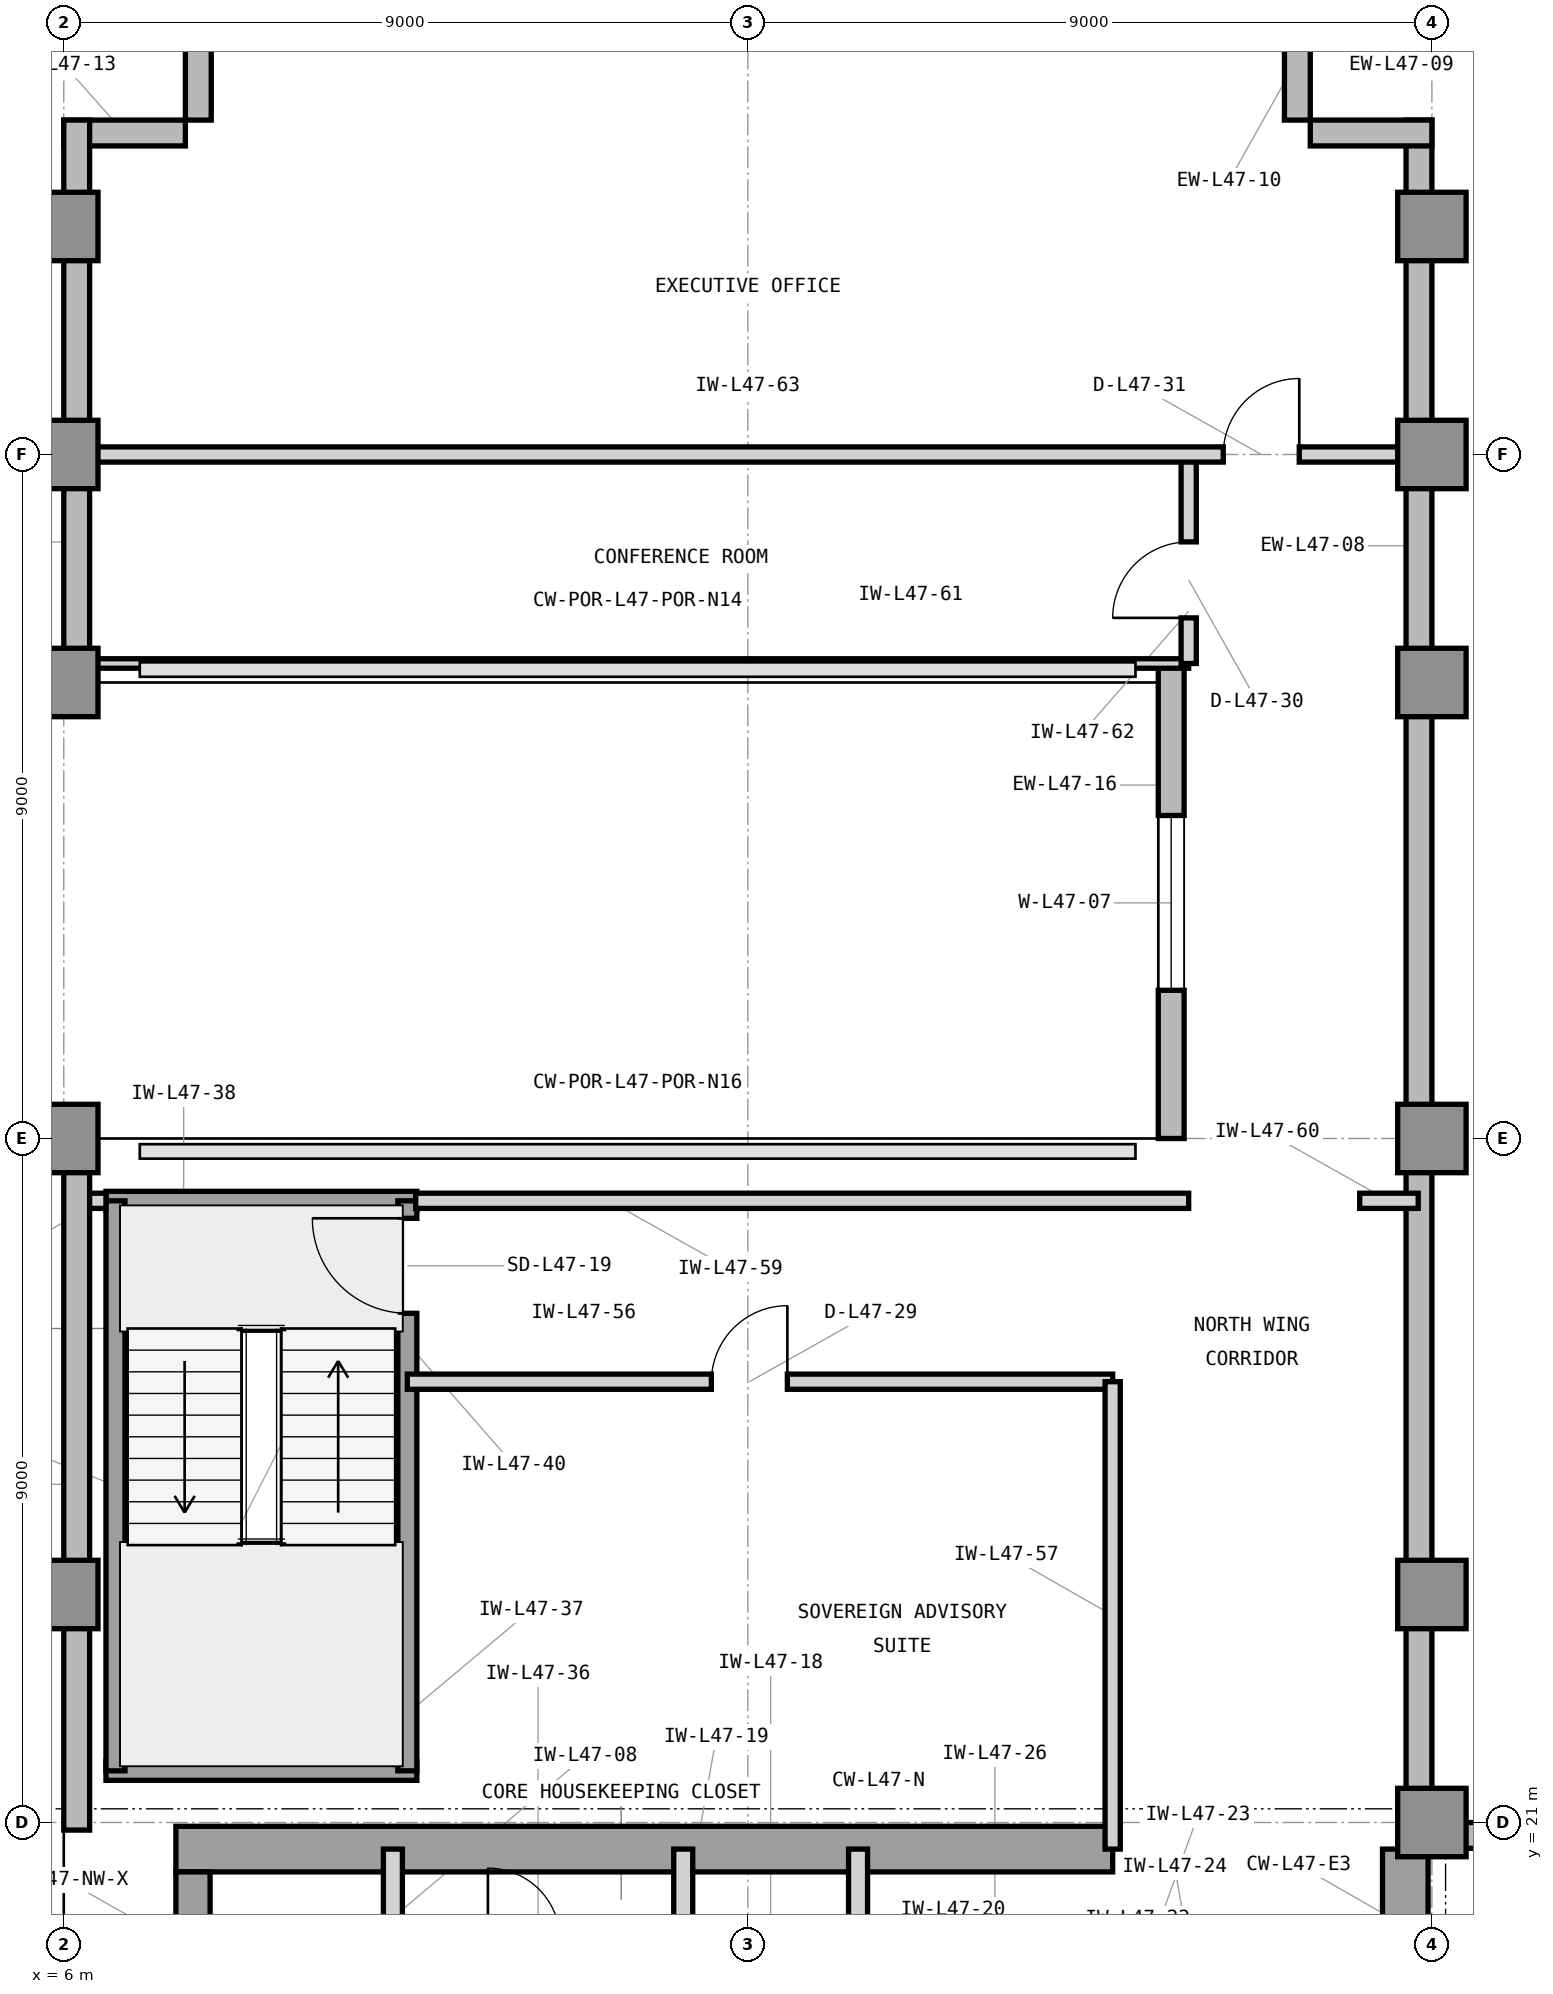
"""IFC4 building model, lengths in metres.
Left out: names, types, materials, properties, quantities, classifications, styles, units other than length and angle.
Written with IfcOpenShell. Run it as: python <this file> out.ifc"""

import sys

from ifc_helpers import new_model, si_unit, direction, frame, frame_2d, origin, origin_2d, place, context, subcontext, project, spatial, rectangle, extrude, element, fill, save


model = new_model("IFC4")
c1 = context("Model", 3, precision=1e-05, world=origin(), true_north=direction((0.0, 1.0)))
c2 = subcontext(c1, "Body", "Model", "MODEL_VIEW")
j1 = project(units=[si_unit("LENGTHUNIT", "METRE"), si_unit("PLANEANGLEUNIT", "RADIAN")], contexts=[c1])
p1 = place(None, origin())
s1 = spatial("IfcSite", under=j1, at=p1, CompositionType="ELEMENT")
p2 = place(p1, origin())
s2 = spatial("IfcBuilding", under=s1, at=p2, CompositionType="ELEMENT")
p3 = place(p2, frame((0.0, 0.0, 195.6)))
s3 = spatial("IfcBuildingStorey", under=s2, at=p3, CompositionType="ELEMENT", Elevation=195.6)
p4 = place(p3, frame((7.475, 20.65, 0.0), z_axis=(0.0, 0.0, 1.0), x_axis=(1.0, 0.0, 0.0)))
e1 = element("IfcWall", 1, at=p4, inside=s3, PredefinedType="SHEAR", context=c2, shape_type="SweptSolid", body=[
    extrude(rectangle(XDim=12.325, YDim=0.6, at=frame_2d((6.163, 0.0))), origin(), (0.0, 0.0, 1.0), 3.9),
])
p5 = place(p3, frame((23.65, 16.6, 0.0), z_axis=(0.0, 0.0, 1.0), x_axis=(0.0, 1.0, 0.0)))
e2 = element("IfcWall", 2, at=p5, inside=s3, PredefinedType="SHEAR", context=c2, shape_type="SweptSolid", body=[
    extrude(rectangle(XDim=4.05, YDim=0.6, at=frame_2d((2.025, 0.0))), origin(), (0.0, 0.0, 1.0), 3.9),
])
p6 = place(p3, frame((7.7, 19.575, 0.0), z_axis=(0.0, 0.0, 1.0), x_axis=(0.0, 1.0, 0.0)))
e3 = element("IfcWall", 3, at=p6, inside=s3, PredefinedType="SHEAR", context=c2, shape_type="SweptSolid", body=[
    extrude(rectangle(XDim=0.775, YDim=0.45, at=frame_2d((0.388, 0.0))), origin(), (0.0, 0.0, 1.0), 3.9),
])
for number, where, z_axis, x_axis in (
    (4, (24.0, 21.0, 0.0), (0.0, 0.0, 1.0), (1.0, 0.0, 0.0)),
    (5, (6.0, 24.0, 0.0), (0.0, 0.0, 1.0), (1.0, 0.0, 0.0)),
    (6, (24.0, 24.0, 0.0), (0.0, 0.0, 1.0), (1.0, 0.0, 0.0)),
    (7, (6.0, 30.0, 0.0), (0.0, 0.0, 1.0), (1.0, 0.0, 0.0)),
    (8, (24.0, 30.0, 0.0), (0.0, 0.0, 1.0), (1.0, 0.0, 0.0)),
    (9, (6.0, 36.0, 0.0), (0.0, 0.0, 1.0), (1.0, 0.0, 0.0)),
    (10, (24.0, 36.0, 0.0), (0.0, 0.0, 1.0), (1.0, 0.0, 0.0)),
    (11, (6.0, 39.0, 0.0), (0.0, 0.0, 1.0), (1.0, 0.0, 0.0)),
    (12, (24.0, 39.0, 0.0), (0.0, 0.0, 1.0), (1.0, 0.0, 0.0)),
):
    element("IfcColumn", number, at=place(p3, frame(where, z_axis=z_axis, x_axis=x_axis)), inside=s3, PredefinedType="COLUMN", context=c2, shape_type="SweptSolid", body=[
        extrude(rectangle(XDim=0.9, YDim=0.9, at=origin_2d()), origin(), (0.0, 0.0, 1.0), 3.9),
    ])
for number, where, z_axis, x_axis in (
    (13, (6.0, 42.0, 0.0), (0.0, 0.0, 1.0), (1.0, 0.0, 0.0)),
    (14, (24.0, 42.0, 0.0), (0.0, 0.0, 1.0), (1.0, 0.0, 0.0)),
):
    element("IfcColumn", number, at=place(p3, frame(where, z_axis=z_axis, x_axis=x_axis)), inside=s3, PredefinedType="COLUMN", context=c2, shape_type="SweptSolid", body=[
        extrude(rectangle(XDim=0.9, YDim=0.9, at=origin_2d()), origin(), (0.0, 0.0, 1.0), 3.689),
    ])
p7 = place(p3, frame((55.4, 20.83, 0.0), z_axis=(0.0, 0.0, 1.0), x_axis=(-1.0, 0.0, 0.0)))
e15 = element("IfcWall", 15, at=p7, inside=s3, PredefinedType="STANDARD", context=c2, shape_type="SweptSolid", body=[
    extrude(rectangle(XDim=31.4, YDim=0.34, at=frame_2d((15.7, 0.0))), origin(), (0.0, 0.0, 1.0), 3.7),
])
p8 = place(p7, frame((17.167, 0.0, 0.9)))
e16 = element("IfcOpeningElement", 16, at=p8, cuts=e15, PredefinedType="OPENING", context=c2, shape_type="SweptSolid", body=[
    extrude(rectangle(XDim=2.3, YDim=2.2, at=frame_2d((1.15, 1.1))), frame((0.0, 0.18, 0.0), z_axis=(0.0, -1.0, 0.0), x_axis=(1.0, 0.0, 0.0)), (0.0, 0.0, 1.0), 0.36),
])
p9 = place(p7, frame((29.046, 0.0, 0.9)))
e17 = element("IfcOpeningElement", 17, at=p9, cuts=e15, PredefinedType="OPENING", context=c2, shape_type="SweptSolid", body=[
    extrude(rectangle(XDim=1.6, YDim=2.2, at=frame_2d((0.8, 1.1))), frame((0.0, 0.18, 0.0), z_axis=(0.0, -1.0, 0.0), x_axis=(1.0, 0.0, 0.0)), (0.0, 0.0, 1.0), 0.36),
])
p10 = place(p7, frame((8.375, 0.0, 0.9)))
e18 = element("IfcOpeningElement", 18, at=p10, cuts=e15, PredefinedType="OPENING", context=c2, shape_type="SweptSolid", body=[
    extrude(rectangle(XDim=2.3, YDim=2.2, at=frame_2d((1.15, 1.1))), frame((0.0, 0.18, 0.0), z_axis=(0.0, -1.0, 0.0), x_axis=(1.0, 0.0, 0.0)), (0.0, 0.0, 1.0), 0.36),
])
p11 = place(p3, frame((23.83, 21.0, 0.0), z_axis=(0.0, 0.0, 1.0), x_axis=(0.0, 1.0, 0.0)))
e19 = element("IfcWall", 19, at=p11, inside=s3, PredefinedType="STANDARD", context=c2, shape_type="SweptSolid", body=[
    extrude(rectangle(XDim=22.4, YDim=0.34, at=frame_2d((11.2, 0.0))), origin(), (0.0, 0.0, 1.0), 3.7),
])
for number, where, z_axis, x_axis in (
    (20, (24.0, 43.23, 0.0), (0.0, 0.0, 1.0), (-1.0, 0.0, 0.0)),
    (21, (22.23, 43.4, 0.0), (0.0, 0.0, 1.0), (0.0, 1.0, 0.0)),
    (22, (7.77, 45.0, 0.0), (0.0, 0.0, 1.0), (0.0, -1.0, 0.0)),
    (23, (7.6, 43.23, 0.0), (0.0, 0.0, 1.0), (-1.0, 0.0, 0.0)),
):
    element("IfcWall", number, at=place(p3, frame(where, z_axis=z_axis, x_axis=x_axis)), inside=s3, PredefinedType="STANDARD", context=c2, shape_type="SweptSolid", body=[
        extrude(rectangle(XDim=1.6, YDim=0.34, at=frame_2d((0.8, 0.0))), origin(), (0.0, 0.0, 1.0), 3.7),
    ])
p12 = place(p3, frame((6.17, 43.4, 0.0), z_axis=(0.0, 0.0, 1.0), x_axis=(0.0, -1.0, 0.0)))
e24 = element("IfcWall", 24, at=p12, inside=s3, PredefinedType="STANDARD", context=c2, shape_type="SweptSolid", body=[
    extrude(rectangle(XDim=7.4, YDim=0.34, at=frame_2d((3.7, 0.0))), origin(), (0.0, 0.0, 1.0), 3.7),
])
p13 = place(p3, frame((20.57, 36.2, 0.0), z_axis=(0.0, 0.0, 1.0), x_axis=(0.0, -1.0, 0.0)))
e25 = element("IfcWall", 25, at=p13, inside=s3, PredefinedType="STANDARD", context=c2, shape_type="SweptSolid", body=[
    extrude(rectangle(XDim=6.2, YDim=0.34, at=frame_2d((3.1, 0.0))), origin(), (0.0, 0.0, 1.0), 3.7),
])
p14 = place(p13, frame((1.95, 0.0, 0.9)))
e26 = element("IfcOpeningElement", 26, at=p14, cuts=e25, PredefinedType="OPENING", context=c2, shape_type="SweptSolid", body=[
    extrude(rectangle(XDim=2.3, YDim=2.2, at=frame_2d((1.15, 1.1))), frame((0.0, 0.18, 0.0), z_axis=(0.0, -1.0, 0.0), x_axis=(1.0, 0.0, 0.0)), (0.0, 0.0, 1.0), 0.36),
])
p15 = place(p3, frame((6.17, 30.0, 0.0), z_axis=(0.0, 0.0, 1.0), x_axis=(0.0, -1.0, 0.0)))
e27 = element("IfcWall", 27, at=p15, inside=s3, PredefinedType="STANDARD", context=c2, shape_type="SweptSolid", body=[
    extrude(rectangle(XDim=9.1, YDim=0.34, at=frame_2d((4.55, 0.0))), origin(), (0.0, 0.0, 1.0), 3.7),
])
p16 = place(p3, frame((10.33, 19.45, 0.0), z_axis=(0.0, 0.0, 1.0), x_axis=(0.0, 1.0, 0.0)))
e28 = element("IfcWall", 28, at=p16, inside=s3, PredefinedType="PARTITIONING", context=c2, shape_type="SweptSolid", body=[
    extrude(rectangle(XDim=1.2, YDim=0.25, at=frame_2d((0.6, 0.0))), origin(), (0.0, 0.0, 1.0), 3.69),
])
for number, where, z_axis, x_axis in (
    (29, (14.15, 16.7, 0.0), (0.0, 0.0, 1.0), (0.0, 1.0, 0.0)),
    (30, (16.45, 16.7, 0.0), (0.0, 0.0, 1.0), (0.0, 1.0, 0.0)),
):
    element("IfcWall", number, at=place(p3, frame(where, z_axis=z_axis, x_axis=x_axis)), inside=s3, PredefinedType="PARTITIONING", context=c2, shape_type="SweptSolid", body=[
        extrude(rectangle(XDim=3.95, YDim=0.25, at=frame_2d((1.975, 0.0))), origin(), (0.0, 0.0, 1.0), 3.69),
    ])
for number, where, z_axis, x_axis in (
    (31, (6.555, 21.68, 0.0), (0.0, 0.0, 1.0), (1.0, 0.0, 0.0)),
    (32, (6.555, 29.18, 0.0), (0.0, 0.0, 1.0), (1.0, 0.0, 0.0)),
):
    element("IfcWall", number, at=place(p3, frame(where, z_axis=z_axis, x_axis=x_axis)), inside=s3, PredefinedType="SHEAR", context=c2, shape_type="SweptSolid", body=[
        extrude(rectangle(XDim=4.09, YDim=0.25, at=frame_2d((2.045, 0.0))), origin(), (0.0, 0.0, 1.0), 3.9),
    ])
p17 = place(p3, frame((6.68, 21.68, 0.0), z_axis=(0.0, 0.0, 1.0), x_axis=(0.0, 1.0, 0.0)))
e33 = element("IfcWall", 33, at=p17, inside=s3, PredefinedType="SHEAR", context=c2, shape_type="SweptSolid", body=[
    extrude(rectangle(XDim=7.5, YDim=0.25, at=frame_2d((3.75, 0.0))), origin(), (0.0, 0.0, 1.0), 3.9),
])
p18 = place(p3, frame((10.52, 21.68, 0.0), z_axis=(0.0, 0.0, 1.0), x_axis=(0.0, 1.0, 0.0)))
e34 = element("IfcWall", 34, at=p18, inside=s3, PredefinedType="SHEAR", context=c2, shape_type="SweptSolid", body=[
    extrude(rectangle(XDim=7.5, YDim=0.25, at=frame_2d((3.75, 0.0))), origin(), (0.0, 0.0, 1.0), 3.9),
])
p19 = place(p18, frame((6.02, 0.0, 0.0)))
e35 = element("IfcOpeningElement", 35, at=p19, cuts=e34, PredefinedType="OPENING", context=c2, shape_type="SweptSolid", body=[
    extrude(rectangle(XDim=1.25, YDim=2.2, at=frame_2d((0.625, 1.1))), frame((0.0, 0.135, 0.0), z_axis=(0.0, -1.0, 0.0), x_axis=(1.0, 0.0, 0.0)), (0.0, 0.0, 1.0), 0.27),
])
p20 = place(p3, frame((10.52, 26.8, 0.0), z_axis=(0.0, 0.0, 1.0), x_axis=(1.0, 0.0, 0.0)))
e36 = element("IfcWall", 36, at=p20, inside=s3, PredefinedType="PARTITIONING", context=c2, shape_type="SweptSolid", body=[
    extrude(rectangle(XDim=9.28, YDim=0.2, at=frame_2d((4.64, 0.0))), origin(), (0.0, 0.0, 1.0), 3.69),
])
p21 = place(p20, frame((4.0, 0.0, 0.0)))
e37 = element("IfcOpeningElement", 37, at=p21, cuts=e36, PredefinedType="OPENING", context=c2, shape_type="SweptSolid", body=[
    extrude(rectangle(XDim=1.0, YDim=2.15, at=frame_2d((0.5, 1.075))), frame((0.0, 0.11, 0.0), z_axis=(0.0, -1.0, 0.0), x_axis=(1.0, 0.0, 0.0)), (0.0, 0.0, 1.0), 0.22),
])
p22 = place(p3, frame((19.8, 20.65, 0.0), z_axis=(0.0, 0.0, 1.0), x_axis=(0.0, 1.0, 0.0)))
e38 = element("IfcWall", 38, at=p22, inside=s3, PredefinedType="PARTITIONING", context=c2, shape_type="SweptSolid", body=[
    extrude(rectangle(XDim=6.15, YDim=0.2, at=frame_2d((3.075, 0.0))), origin(), (0.0, 0.0, 1.0), 3.69),
])
p23 = place(p3, frame((6.34, 29.18, 0.0), z_axis=(0.0, 0.0, 1.0), x_axis=(1.0, 0.0, 0.0)))
e39 = element("IfcWall", 39, at=p23, inside=s3, PredefinedType="PARTITIONING", context=c2, shape_type="SweptSolid", body=[
    extrude(rectangle(XDim=0.215, YDim=0.2, at=frame_2d((0.107, 0.0))), origin(), (0.0, 0.0, 1.0), 3.69),
])
p24 = place(p3, frame((10.63, 29.18, 0.0), z_axis=(0.0, 0.0, 1.0), x_axis=(1.0, 0.0, 0.0)))
e40 = element("IfcWall", 40, at=p24, inside=s3, PredefinedType="PARTITIONING", context=c2, shape_type="SweptSolid", body=[
    extrude(rectangle(XDim=10.17, YDim=0.2, at=frame_2d((5.085, 0.0))), origin(), (0.0, 0.0, 1.0), 3.69),
])
p25 = place(p3, frame((23.05, 29.18, 0.0), z_axis=(0.0, 0.0, 1.0), x_axis=(1.0, 0.0, 0.0)))
e41 = element("IfcWall", 41, at=p25, inside=s3, PredefinedType="PARTITIONING", context=c2, shape_type="SweptSolid", body=[
    extrude(rectangle(XDim=0.77, YDim=0.2, at=frame_2d((0.385, 0.0))), origin(), (0.0, 0.0, 1.0), 3.69),
])
p26 = place(p3, frame((6.18, 36.25, 0.0), z_axis=(0.0, 0.0, 1.0), x_axis=(1.0, 0.0, 0.0)))
e42 = element("IfcWall", 42, at=p26, inside=s3, PredefinedType="PARTITIONING", context=c2, shape_type="SweptSolid", body=[
    extrude(rectangle(XDim=14.62, YDim=0.125, at=frame_2d((7.31, 0.0))), origin(), (0.0, 0.0, 1.0), 3.69),
])
p27 = place(p3, frame((20.8, 36.25, 0.0), z_axis=(0.0, 0.0, 1.0), x_axis=(0.0, 1.0, 0.0)))
e43 = element("IfcWall", 43, at=p27, inside=s3, PredefinedType="PARTITIONING", context=c2, shape_type="SweptSolid", body=[
    extrude(rectangle(XDim=2.75, YDim=0.2, at=frame_2d((1.375, 0.0))), origin(), (0.0, 0.0, 1.0), 3.69),
])
p28 = place(p27, frame((0.6, 0.0, 0.0)))
e44 = element("IfcOpeningElement", 44, at=p28, cuts=e43, PredefinedType="OPENING", context=c2, shape_type="SweptSolid", body=[
    extrude(rectangle(XDim=1.0, YDim=2.15, at=frame_2d((0.5, 1.075))), frame((0.0, 0.11, 0.0), z_axis=(0.0, -1.0, 0.0), x_axis=(1.0, 0.0, 0.0)), (0.0, 0.0, 1.0), 0.22),
])
p29 = place(p3, frame((6.18, 39.0, 0.0), z_axis=(0.0, 0.0, 1.0), x_axis=(1.0, 0.0, 0.0)))
e45 = element("IfcWall", 45, at=p29, inside=s3, PredefinedType="PARTITIONING", context=c2, shape_type="SweptSolid", body=[
    extrude(rectangle(XDim=17.64, YDim=0.2, at=frame_2d((8.82, 0.0))), origin(), (0.0, 0.0, 1.0), 3.073),
])
p30 = place(p29, frame((15.075, 0.0, 0.0)))
e46 = element("IfcOpeningElement", 46, at=p30, cuts=e45, PredefinedType="OPENING", context=c2, shape_type="SweptSolid", body=[
    extrude(rectangle(XDim=1.0, YDim=2.15, at=frame_2d((0.5, 1.075))), frame((0.0, 0.11, 0.0), z_axis=(0.0, -1.0, 0.0), x_axis=(1.0, 0.0, 0.0)), (0.0, 0.0, 1.0), 0.22),
])
p31 = place(p14, origin())
e47 = element("IfcWindow", 47, at=p31, inside=s3, PartitioningType="SINGLE_PANEL", PredefinedType="WINDOW", context=c2, shape_type="SweptSolid", body=[
    extrude(rectangle(XDim=2.3, YDim=2.2, at=frame_2d((1.15, 1.1))), frame((0.0, 0.11, 0.0), z_axis=(0.0, -1.0, 0.0), x_axis=(1.0, 0.0, 0.0)), (0.0, 0.0, 1.0), 0.06),
])
fill(e26, e47)
p32 = place(p19, origin())
e48 = element("IfcDoor", 48, at=p32, inside=s3, OperationType="SINGLE_SWING_RIGHT", PredefinedType="DOOR", context=c2, shape_type="SweptSolid", body=[
    extrude(rectangle(XDim=1.25, YDim=2.2, at=frame_2d((0.625, 1.1))), frame((0.0, 0.025, 0.0), z_axis=(0.0, -1.0, 0.0), x_axis=(1.0, 0.0, 0.0)), (0.0, 0.0, 1.0), 0.05),
])
fill(e35, e48)
p33 = place(p21, origin())
e49 = element("IfcDoor", 49, at=p33, inside=s3, OperationType="SINGLE_SWING_RIGHT", PredefinedType="DOOR", context=c2, shape_type="SweptSolid", body=[
    extrude(rectangle(XDim=1.0, YDim=2.15, at=frame_2d((0.5, 1.075))), frame((0.0, 0.025, 0.0), z_axis=(0.0, -1.0, 0.0), x_axis=(1.0, 0.0, 0.0)), (0.0, 0.0, 1.0), 0.05),
])
fill(e37, e49)
p34 = place(p28, origin())
e50 = element("IfcDoor", 50, at=p34, inside=s3, OperationType="SINGLE_SWING_LEFT", PredefinedType="DOOR", context=c2, shape_type="SweptSolid", body=[
    extrude(rectangle(XDim=1.0, YDim=2.15, at=frame_2d((0.5, 1.075))), frame((0.0, 0.025, 0.0), z_axis=(0.0, -1.0, 0.0), x_axis=(1.0, 0.0, 0.0)), (0.0, 0.0, 1.0), 0.05),
])
fill(e44, e50)
p35 = place(p30, origin())
e51 = element("IfcDoor", 51, at=p35, inside=s3, OperationType="SINGLE_SWING_RIGHT", PredefinedType="DOOR", context=c2, shape_type="SweptSolid", body=[
    extrude(rectangle(XDim=1.0, YDim=2.15, at=frame_2d((0.5, 1.075))), frame((0.0, 0.025, 0.0), z_axis=(0.0, -1.0, 0.0), x_axis=(1.0, 0.0, 0.0)), (0.0, 0.0, 1.0), 0.05),
])
fill(e46, e51)
save(model, sys.argv[1])
